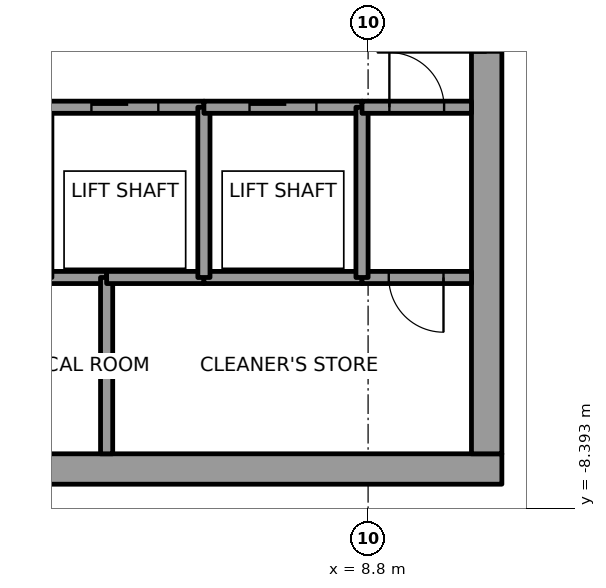
"""IFC4 building model, lengths in metres.
Left out: names, types, materials, properties, quantities, classifications, styles, units other than length and angle.
Written with IfcOpenShell. Run it as: python <this file> out.ifc"""

import sys

from ifc_helpers import new_model, si_unit, direction, frame, frame_2d, origin, place, context, subcontext, project, spatial, rectangle, extrude, element, fill, save


model = new_model("IFC4")
c1 = context("Model", 3, precision=1e-05, world=origin(), true_north=direction((0.0, 1.0)))
c2 = subcontext(c1, "Body", "Model", "MODEL_VIEW")
j1 = project(units=[si_unit("LENGTHUNIT", "METRE"), si_unit("PLANEANGLEUNIT", "RADIAN")], contexts=[c1])
p1 = place(None, origin())
s1 = spatial("IfcSite", under=j1, at=p1, CompositionType="ELEMENT")
p2 = place(p1, origin())
s2 = spatial("IfcBuilding", under=s1, at=p2, CompositionType="ELEMENT")
p3 = place(p2, frame((0.0, 0.0, 235.0)))
s3 = spatial("IfcBuildingStorey", under=s2, at=p3, CompositionType="ELEMENT", Elevation=235.0)
p4 = place(p3, frame((-11.0, -7.75, 0.0), z_axis=(0.0, 0.0, 1.0), x_axis=(1.0, 0.0, 0.0)))
e1 = element("IfcWall", 1, at=p4, inside=s3, PredefinedType="SHEAR", context=c2, shape_type="SweptSolid", body=[
    extrude(rectangle(XDim=22.0, YDim=0.5, at=frame_2d((11.0, 0.0))), origin(), (0.0, 0.0, 1.0), 4.0),
])
p5 = place(p4, frame((10.45, 0.0, 0.0)))
e2 = element("IfcOpeningElement", 2, at=p5, cuts=e1, PredefinedType="OPENING", context=c2, shape_type="SweptSolid", body=[
    extrude(rectangle(XDim=1.1, YDim=2.1, at=frame_2d((0.55, 1.05))), frame((0.0, 0.25, 0.0), z_axis=(0.0, -1.0, 0.0), x_axis=(1.0, 0.0, 0.0)), (0.0, 0.0, 1.0), 0.5),
])
p6 = place(p3, frame((10.75, -7.5, 0.0), z_axis=(0.0, 0.0, 1.0), x_axis=(0.0, 1.0, 0.0)))
e3 = element("IfcWall", 3, at=p6, inside=s3, PredefinedType="SHEAR", context=c2, shape_type="SweptSolid", body=[
    extrude(rectangle(XDim=15.0, YDim=0.5, at=frame_2d((7.5, 0.0))), origin(), (0.0, 0.0, 1.0), 4.0),
])
p7 = place(p6, frame((6.6, 0.0, 0.0)))
e4 = element("IfcOpeningElement", 4, at=p7, cuts=e3, PredefinedType="OPENING", context=c2, shape_type="SweptSolid", body=[
    extrude(rectangle(XDim=1.8, YDim=2.1, at=frame_2d((0.9, 1.05))), frame((0.0, 0.25, 0.0), z_axis=(0.0, -1.0, 0.0), x_axis=(1.0, 0.0, 0.0)), (0.0, 0.0, 1.0), 0.5),
])
p8 = place(p3, frame((4.5, -4.6, 0.0), z_axis=(0.0, 0.0, 1.0), x_axis=(-1.0, 0.0, 0.0)))
e5 = element("IfcWall", 5, at=p8, inside=s3, PredefinedType="SOLIDWALL", context=c2, shape_type="SweptSolid", body=[
    extrude(rectangle(XDim=1.0, YDim=0.2, at=frame_2d((0.5, 0.0))), origin(), (0.0, 0.0, 1.0), 3.85),
])
p9 = place(p3, frame((3.5, -1.8, 0.0), z_axis=(0.0, 0.0, 1.0), x_axis=(1.0, 0.0, 0.0)))
e6 = element("IfcWall", 6, at=p9, inside=s3, PredefinedType="SOLIDWALL", context=c2, shape_type="SweptSolid", body=[
    extrude(rectangle(XDim=2.6, YDim=0.2, at=frame_2d((1.3, 0.0))), origin(), (0.0, 0.0, 1.0), 3.85),
])
p10 = place(p9, frame((0.75, 0.0, 0.0)))
e7 = element("IfcOpeningElement", 7, at=p10, cuts=e6, PredefinedType="OPENING", context=c2, shape_type="SweptSolid", body=[
    extrude(rectangle(XDim=1.1, YDim=2.1, at=frame_2d((0.55, 1.05))), frame((0.0, 0.1, 0.0), z_axis=(0.0, -1.0, 0.0), x_axis=(1.0, 0.0, 0.0)), (0.0, 0.0, 1.0), 0.2),
])
p11 = place(p3, frame((4.5, -4.6, 0.0), z_axis=(0.0, 0.0, 1.0), x_axis=(0.0, -1.0, 0.0)))
e8 = element("IfcWall", 8, at=p11, inside=s3, PredefinedType="SOLIDWALL", context=c2, shape_type="SweptSolid", body=[
    extrude(rectangle(XDim=2.9, YDim=0.2, at=frame_2d((1.45, 0.0))), origin(), (0.0, 0.0, 1.0), 3.85),
])
p12 = place(p3, frame((6.1, -4.6, 0.0), z_axis=(0.0, 0.0, 1.0), x_axis=(-1.0, 0.0, 0.0)))
e9 = element("IfcWall", 9, at=p12, inside=s3, PredefinedType="SOLIDWALL", context=c2, shape_type="SweptSolid", body=[
    extrude(rectangle(XDim=1.6, YDim=0.2, at=frame_2d((0.8, 0.0))), origin(), (0.0, 0.0, 1.0), 3.85),
])
p13 = place(p3, frame((8.7, -4.6, 0.0), z_axis=(0.0, 0.0, 1.0), x_axis=(-1.0, 0.0, 0.0)))
e10 = element("IfcWall", 10, at=p13, inside=s3, PredefinedType="SOLIDWALL", context=c2, shape_type="SweptSolid", body=[
    extrude(rectangle(XDim=2.6, YDim=0.2, at=frame_2d((1.3, 0.0))), origin(), (0.0, 0.0, 1.0), 3.85),
])
p14 = place(p3, frame((6.1, -4.6, 0.0), z_axis=(0.0, 0.0, 1.0), x_axis=(0.0, 1.0, 0.0)))
e11 = element("IfcWall", 11, at=p14, inside=s3, PredefinedType="SOLIDWALL", context=c2, shape_type="SweptSolid", body=[
    extrude(rectangle(XDim=2.8, YDim=0.2, at=frame_2d((1.4, 0.0))), origin(), (0.0, 0.0, 1.0), 3.85),
])
p15 = place(p3, frame((6.1, -1.8, 0.0), z_axis=(0.0, 0.0, 1.0), x_axis=(1.0, 0.0, 0.0)))
e12 = element("IfcWall", 12, at=p15, inside=s3, PredefinedType="SOLIDWALL", context=c2, shape_type="SweptSolid", body=[
    extrude(rectangle(XDim=2.6, YDim=0.2, at=frame_2d((1.3, 0.0))), origin(), (0.0, 0.0, 1.0), 3.85),
])
p16 = place(p15, frame((0.75, 0.0, 0.0)))
e13 = element("IfcOpeningElement", 13, at=p16, cuts=e12, PredefinedType="OPENING", context=c2, shape_type="SweptSolid", body=[
    extrude(rectangle(XDim=1.1, YDim=2.1, at=frame_2d((0.55, 1.05))), frame((0.0, 0.1, 0.0), z_axis=(0.0, -1.0, 0.0), x_axis=(1.0, 0.0, 0.0)), (0.0, 0.0, 1.0), 0.2),
])
p17 = place(p3, frame((10.5, -4.6, 0.0), z_axis=(0.0, 0.0, 1.0), x_axis=(-1.0, 0.0, 0.0)))
e14 = element("IfcWall", 14, at=p17, inside=s3, PredefinedType="SOLIDWALL", context=c2, shape_type="SweptSolid", body=[
    extrude(rectangle(XDim=1.8, YDim=0.2, at=frame_2d((0.9, 0.0))), origin(), (0.0, 0.0, 1.0), 3.85),
])
p18 = place(p17, frame((0.46, 0.0, 0.0)))
e15 = element("IfcOpeningElement", 15, at=p18, cuts=e14, PredefinedType="OPENING", context=c2, shape_type="SweptSolid", body=[
    extrude(rectangle(XDim=0.9, YDim=2.1, at=frame_2d((0.45, 1.05))), frame((0.0, 0.1, 0.0), z_axis=(0.0, -1.0, 0.0), x_axis=(1.0, 0.0, 0.0)), (0.0, 0.0, 1.0), 0.2),
])
p19 = place(p3, frame((8.7, -1.8, 0.0), z_axis=(0.0, 0.0, 1.0), x_axis=(0.0, -1.0, 0.0)))
e16 = element("IfcWall", 16, at=p19, inside=s3, PredefinedType="SOLIDWALL", context=c2, shape_type="SweptSolid", body=[
    extrude(rectangle(XDim=2.8, YDim=0.2, at=frame_2d((1.4, 0.0))), origin(), (0.0, 0.0, 1.0), 3.85),
])
p20 = place(p3, frame((8.7, -1.8, 0.0), z_axis=(0.0, 0.0, 1.0), x_axis=(1.0, 0.0, 0.0)))
e17 = element("IfcWall", 17, at=p20, inside=s3, PredefinedType="SOLIDWALL", context=c2, shape_type="SweptSolid", body=[
    extrude(rectangle(XDim=1.8, YDim=0.2, at=frame_2d((0.9, 0.0))), origin(), (0.0, 0.0, 1.0), 3.85),
])
p21 = place(p20, frame((0.45, 0.0, 0.0)))
e18 = element("IfcOpeningElement", 18, at=p21, cuts=e17, PredefinedType="OPENING", context=c2, shape_type="SweptSolid", body=[
    extrude(rectangle(XDim=0.9, YDim=2.1, at=frame_2d((0.45, 1.05))), frame((0.0, 0.1, 0.0), z_axis=(0.0, -1.0, 0.0), x_axis=(1.0, 0.0, 0.0)), (0.0, 0.0, 1.0), 0.2),
])
p22 = place(p10, origin())
e19 = element("IfcDoor", 19, at=p22, inside=s3, OperationType="SLIDING_TO_RIGHT", PredefinedType="DOOR", context=c2, shape_type="SweptSolid", body=[
    extrude(rectangle(XDim=1.1, YDim=2.1, at=frame_2d((0.55, 1.05))), frame((0.0, 0.025, 0.0), z_axis=(0.0, -1.0, 0.0), x_axis=(1.0, 0.0, 0.0)), (0.0, 0.0, 1.0), 0.05),
])
fill(e7, e19)
p23 = place(p16, origin())
e20 = element("IfcDoor", 20, at=p23, inside=s3, OperationType="SLIDING_TO_RIGHT", PredefinedType="DOOR", context=c2, shape_type="SweptSolid", body=[
    extrude(rectangle(XDim=1.1, YDim=2.1, at=frame_2d((0.55, 1.05))), frame((0.0, 0.025, 0.0), z_axis=(0.0, -1.0, 0.0), x_axis=(1.0, 0.0, 0.0)), (0.0, 0.0, 1.0), 0.05),
])
fill(e13, e20)
p24 = place(p18, origin())
e21 = element("IfcDoor", 21, at=p24, inside=s3, OperationType="SINGLE_SWING_RIGHT", PredefinedType="DOOR", context=c2, shape_type="SweptSolid", body=[
    extrude(rectangle(XDim=0.9, YDim=2.1, at=frame_2d((0.45, 1.05))), frame((0.0, 0.025, 0.0), z_axis=(0.0, -1.0, 0.0), x_axis=(1.0, 0.0, 0.0)), (0.0, 0.0, 1.0), 0.05),
])
fill(e15, e21)
p25 = place(p21, origin())
e22 = element("IfcDoor", 22, at=p25, inside=s3, OperationType="SINGLE_SWING_RIGHT", PredefinedType="DOOR", context=c2, shape_type="SweptSolid", body=[
    extrude(rectangle(XDim=0.9, YDim=2.1, at=frame_2d((0.45, 1.05))), frame((0.0, 0.025, 0.0), z_axis=(0.0, -1.0, 0.0), x_axis=(1.0, 0.0, 0.0)), (0.0, 0.0, 1.0), 0.05),
])
fill(e18, e22)
p26 = place(p7, origin())
e23 = element("IfcDoor", 23, at=p26, inside=s3, OperationType="DOUBLE_DOOR_SINGLE_SWING", PredefinedType="DOOR", context=c2, shape_type="SweptSolid", body=[
    extrude(rectangle(XDim=1.8, YDim=2.1, at=frame_2d((0.9, 1.05))), frame((0.0, 0.025, 0.0), z_axis=(0.0, -1.0, 0.0), x_axis=(1.0, 0.0, 0.0)), (0.0, 0.0, 1.0), 0.05),
])
fill(e4, e23)
save(model, sys.argv[1])
